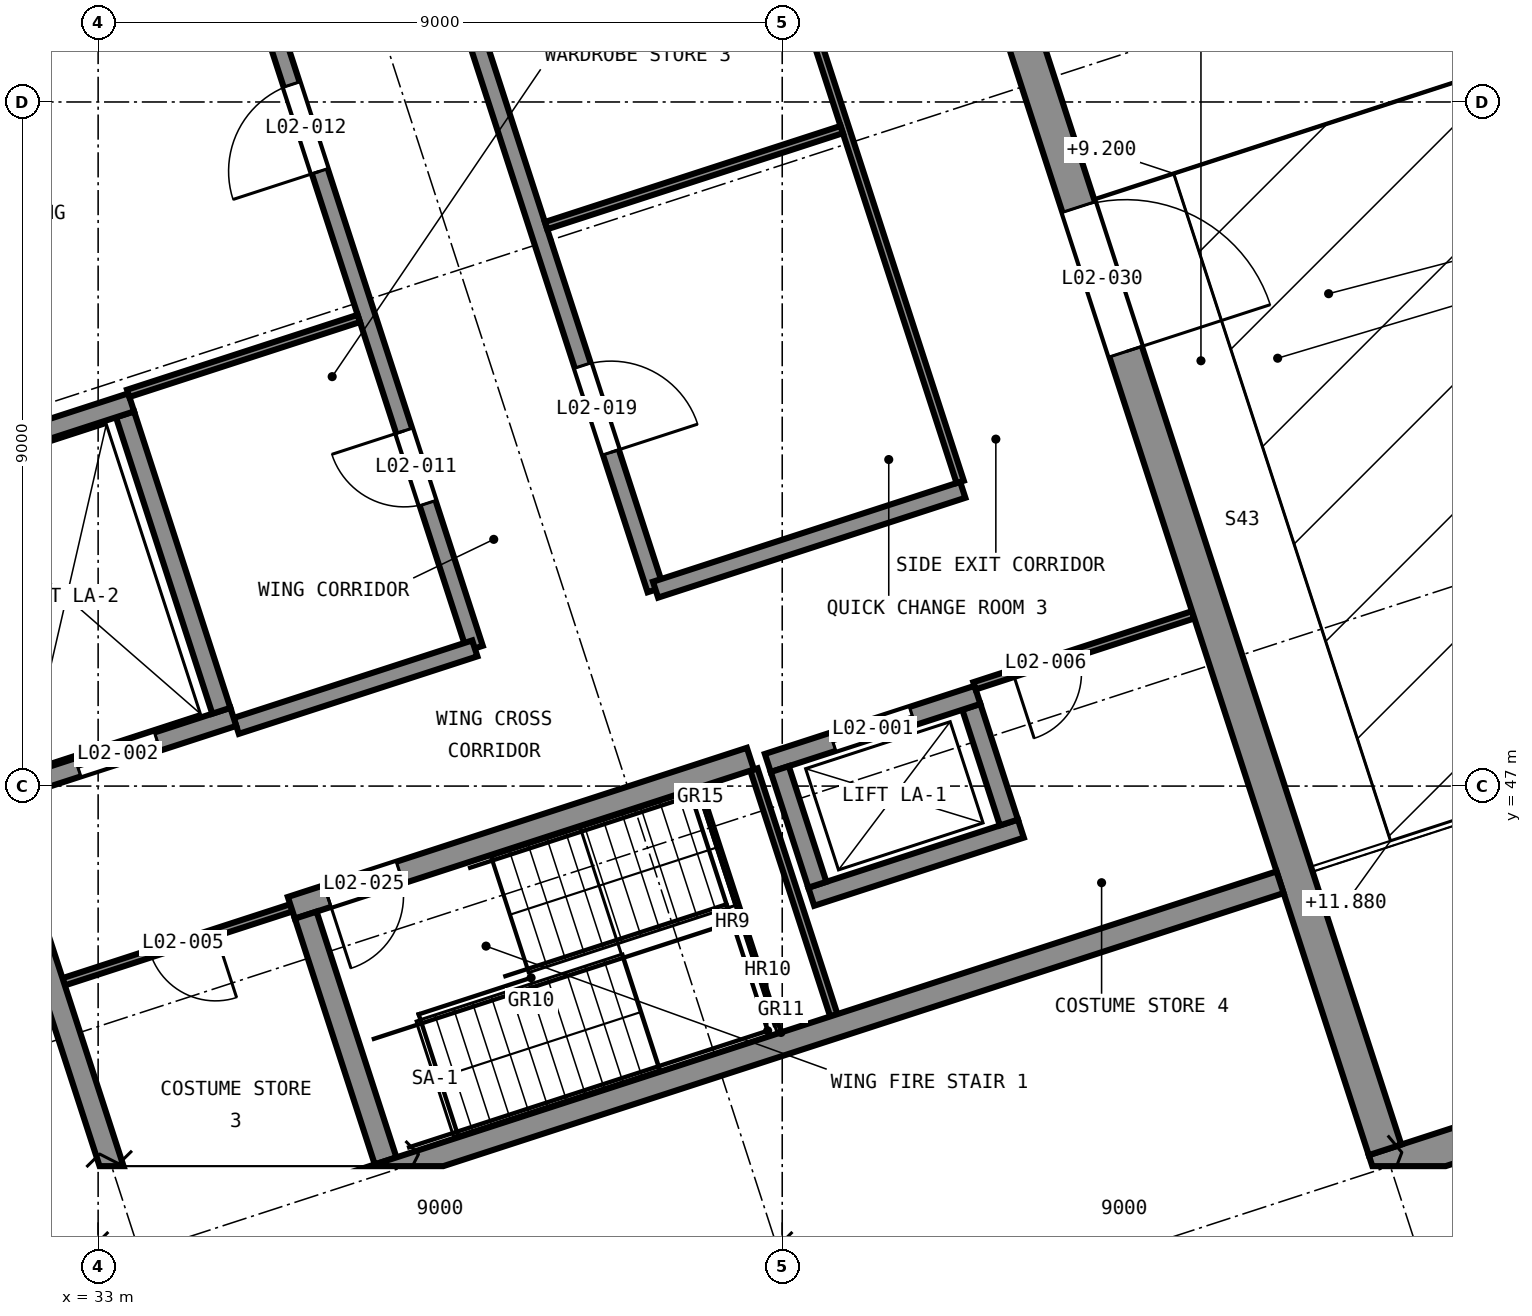
"""IFC4 building model, lengths in metres.
Left out: names, types, materials, properties, quantities, classifications, styles, units other than length and angle.
Written with IfcOpenShell. Run it as: python <this file> out.ifc"""

import sys

from ifc_helpers import new_model, si_unit, direction, frame, frame_2d, origin, place, context, subcontext, project, spatial, rectangle, extrude, element, fill, save


model = new_model("IFC4")
c1 = context("Model", 3, precision=1e-05, world=origin(), true_north=direction((0.0, 1.0)))
c2 = subcontext(c1, "Body", "Model", "MODEL_VIEW")
j1 = project(units=[si_unit("LENGTHUNIT", "METRE"), si_unit("PLANEANGLEUNIT", "RADIAN")], contexts=[c1])
p1 = place(None, origin())
s1 = spatial("IfcSite", under=j1, at=p1, CompositionType="ELEMENT")
p2 = place(p1, origin())
s2 = spatial("IfcBuilding", under=s1, at=p2, CompositionType="ELEMENT")
p3 = place(p2, frame((0.0, 0.0, 9.5)))
s3 = spatial("IfcBuildingStorey", under=s2, at=p3, CompositionType="ELEMENT", Elevation=9.5)
p4 = place(p3, frame((49.786, 41.93, 0.0), z_axis=(0.0, 0.0, 1.0), x_axis=(0.951055937194, 0.309018776661, 0.0)))
e1 = element("IfcWall", 1, at=p4, inside=s3, PredefinedType="SHEAR", context=c2, shape_type="SweptSolid", body=[
    extrude(rectangle(XDim=29.45, YDim=0.45, at=frame_2d((14.725, 0.0))), origin(), (0.0, 0.0, 1.0), 4.0),
])
p5 = place(p3, frame((49.93, 42.214, 0.0), z_axis=(0.0, 0.0, 1.0), x_axis=(-0.309016215614, 0.95105676933, 0.0)))
e2 = element("IfcWall", 2, at=p5, inside=s3, PredefinedType="SHEAR", context=c2, shape_type="SweptSolid", body=[
    extrude(rectangle(XDim=27.975, YDim=0.45, at=frame_2d((13.988, 0.0))), origin(), (0.0, 0.0, 1.0), 4.0),
])
p6 = place(p5, frame((11.042, 0.0, 0.0)))
e3 = element("IfcOpeningElement", 3, at=p6, cuts=e2, PredefinedType="OPENING", context=c2, shape_type="SweptSolid", body=[
    extrude(rectangle(XDim=2.0, YDim=2.4, at=frame_2d((1.0, 1.2))), frame((0.0, 0.235, 0.0), z_axis=(0.0, -1.0, 0.0), x_axis=(1.0, 0.0, 0.0)), (0.0, 0.0, 1.0), 0.47),
])
p7 = place(p3, frame((48.55, 45.735, 0.0), z_axis=(0.0, 0.0, 1.0), x_axis=(-0.951061216338, -0.309002528757, 0.0)))
e4 = element("IfcWall", 4, at=p7, inside=s3, PredefinedType="SOLIDWALL", context=c2, shape_type="SweptSolid", body=[
    extrude(rectangle(XDim=15.925, YDim=0.3, at=frame_2d((7.962, 0.0))), origin(), (0.0, 0.0, 1.0), 4.0),
])
p8 = place(p3, frame((33.501, 41.003, 0.0), z_axis=(0.0, 0.0, 1.0), x_axis=(-0.309017194826, 0.951056451165, 0.0)))
e5 = element("IfcWall", 5, at=p8, inside=s3, PredefinedType="SOLIDWALL", context=c2, shape_type="SweptSolid", body=[
    extrude(rectangle(XDim=53.7, YDim=0.3, at=frame_2d((26.85, 0.0))), origin(), (0.0, 0.0, 1.0), 4.0),
])
p9 = place(p8, frame((21.55, 0.0, 0.9)))
e6 = element("IfcOpeningElement", 6, at=p9, cuts=e5, PredefinedType="OPENING", context=c2, shape_type="SweptSolid", body=[
    extrude(rectangle(XDim=3.6, YDim=2.1, at=frame_2d((1.8, 1.05))), frame((0.0, 0.16, 0.0), z_axis=(0.0, -1.0, 0.0), x_axis=(1.0, 0.0, 0.0)), (0.0, 0.0, 1.0), 0.32),
])
p10 = place(p3, frame((41.581, 47.361, 0.0), z_axis=(0.0, 0.0, 1.0), x_axis=(-0.951058929949, -0.309009565815, 0.0)))
e7 = element("IfcWall", 7, at=p10, inside=s3, PredefinedType="SOLIDWALL", context=c2, shape_type="SweptSolid", body=[
    extrude(rectangle(XDim=6.35, YDim=0.3, at=frame_2d((3.175, 0.0))), origin(), (0.0, 0.0, 1.0), 3.7),
])
p11 = place(p10, frame((4.85, 0.0, 0.0)))
e8 = element("IfcOpeningElement", 8, at=p11, cuts=e7, PredefinedType="OPENING", context=c2, shape_type="SweptSolid", body=[
    extrude(rectangle(XDim=1.0, YDim=2.1, at=frame_2d((0.5, 1.05))), frame((0.0, 0.16, 0.0), z_axis=(0.0, -1.0, 0.0), x_axis=(1.0, 0.0, 0.0)), (0.0, 0.0, 1.0), 0.32),
])
p12 = place(p3, frame((35.731, 45.302, 0.0), z_axis=(0.0, 0.0, 1.0), x_axis=(0.308980533303, -0.951068362443, 0.0)))
e9 = element("IfcWall", 9, at=p12, inside=s3, PredefinedType="SOLIDWALL", context=c2, shape_type="SweptSolid", body=[
    extrude(rectangle(XDim=3.4, YDim=0.3, at=frame_2d((1.7, 0.0))), origin(), (0.0, 0.0, 1.0), 3.7),
])
p13 = place(p3, frame((42.382, 45.544, 0.0), z_axis=(0.0, 0.0, 1.0), x_axis=(0.951071801089, 0.308969948659, 0.0)))
e10 = element("IfcWall", 10, at=p13, inside=s3, PredefinedType="SHEAR", context=c2, shape_type="SweptSolid", body=[
    extrude(rectangle(XDim=2.9, YDim=0.25, at=frame_2d((1.45, 0.0))), origin(), (0.0, 0.0, 1.0), 4.0),
])
p14 = place(p3, frame((44.982, 46.521, 0.0), z_axis=(0.0, 0.0, 1.0), x_axis=(-0.308986014439, 0.951066581729, 0.0)))
e11 = element("IfcWall", 11, at=p14, inside=s3, PredefinedType="SHEAR", context=c2, shape_type="SweptSolid", body=[
    extrude(rectangle(XDim=1.6, YDim=0.25, at=frame_2d((0.8, 0.0))), origin(), (0.0, 0.0, 1.0), 4.0),
])
p15 = place(p3, frame((44.568, 48.2, 0.0), z_axis=(0.0, 0.0, 1.0), x_axis=(-0.951047059821, -0.309046096893, 0.0)))
e12 = element("IfcWall", 12, at=p15, inside=s3, PredefinedType="SHEAR", context=c2, shape_type="SweptSolid", body=[
    extrude(rectangle(XDim=2.9, YDim=0.25, at=frame_2d((1.45, 0.0))), origin(), (0.0, 0.0, 1.0), 4.0),
])
p16 = place(p15, frame((0.9, 0.0, 0.0)))
e13 = element("IfcOpeningElement", 13, at=p16, cuts=e12, PredefinedType="OPENING", context=c2, shape_type="SweptSolid", body=[
    extrude(rectangle(XDim=1.1, YDim=2.1, at=frame_2d((0.55, 1.05))), frame((0.0, 0.135, 0.0), z_axis=(0.0, -1.0, 0.0), x_axis=(1.0, 0.0, 0.0)), (0.0, 0.0, 1.0), 0.27),
])
p17 = place(p3, frame((41.968, 47.224, 0.0), z_axis=(0.0, 0.0, 1.0), x_axis=(0.308986014439, -0.951066581729, 0.0)))
e14 = element("IfcWall", 14, at=p17, inside=s3, PredefinedType="SHEAR", context=c2, shape_type="SweptSolid", body=[
    extrude(rectangle(XDim=1.6, YDim=0.25, at=frame_2d((0.8, 0.0))), origin(), (0.0, 0.0, 1.0), 4.0),
])
p18 = place(p3, frame((31.735, 46.922, 0.0), z_axis=(0.0, 0.0, 1.0), x_axis=(0.95104415986, 0.309055020985, 0.0)))
e15 = element("IfcWall", 15, at=p18, inside=s3, PredefinedType="SHEAR", context=c2, shape_type="SweptSolid", body=[
    extrude(rectangle(XDim=3.2, YDim=0.25, at=frame_2d((1.6, 0.0))), origin(), (0.0, 0.0, 1.0), 4.0),
])
p19 = place(p18, frame((1.05, 0.0, 0.0)))
e16 = element("IfcOpeningElement", 16, at=p19, cuts=e15, PredefinedType="OPENING", context=c2, shape_type="SweptSolid", body=[
    extrude(rectangle(XDim=1.1, YDim=2.1, at=frame_2d((0.55, 1.05))), frame((0.0, 0.135, 0.0), z_axis=(0.0, -1.0, 0.0), x_axis=(1.0, 0.0, 0.0)), (0.0, 0.0, 1.0), 0.27),
])
p20 = place(p3, frame((34.621, 47.991, 0.0), z_axis=(0.0, 0.0, 1.0), x_axis=(-0.309055103076, 0.951044133184, 0.0)))
e17 = element("IfcWall", 17, at=p20, inside=s3, PredefinedType="SHEAR", context=c2, shape_type="SweptSolid", body=[
    extrude(rectangle(XDim=4.1, YDim=0.25, at=frame_2d((2.05, 0.0))), origin(), (0.0, 0.0, 1.0), 4.0),
])
p21 = place(p3, frame((33.434, 52.048, 0.0), z_axis=(0.0, 0.0, 1.0), x_axis=(-0.951066581729, -0.308986014439, 0.0)))
e18 = element("IfcWall", 18, at=p21, inside=s3, PredefinedType="SHEAR", context=c2, shape_type="SweptSolid", body=[
    extrude(rectangle(XDim=3.2, YDim=0.25, at=frame_2d((1.6, 0.0))), origin(), (0.0, 0.0, 1.0), 4.0),
])
p22 = place(p3, frame((37.956, 48.812, 0.0), z_axis=(0.0, 0.0, 1.0), x_axis=(-0.30901736393, 0.951056396219, 0.0)))
e19 = element("IfcWall", 19, at=p22, inside=s3, PredefinedType="SOLIDWALL", context=c2, shape_type="SweptSolid", body=[
    extrude(rectangle(XDim=41.7, YDim=0.22, at=frame_2d((20.85, 0.0))), origin(), (0.0, 0.0, 1.0), 3.7),
])
p23 = place(p22, frame((2.009, 0.0, 0.0)))
e20 = element("IfcOpeningElement", 20, at=p23, cuts=e19, PredefinedType="OPENING", context=c2, shape_type="SweptSolid", body=[
    extrude(rectangle(XDim=1.0, YDim=2.1, at=frame_2d((0.5, 1.05))), frame((0.0, 0.12, 0.0), z_axis=(0.0, -1.0, 0.0), x_axis=(1.0, 0.0, 0.0)), (0.0, 0.0, 1.0), 0.24),
])
p24 = place(p22, frame((6.6, 0.0, 0.0)))
e21 = element("IfcOpeningElement", 21, at=p24, cuts=e19, PredefinedType="OPENING", context=c2, shape_type="SweptSolid", body=[
    extrude(rectangle(XDim=1.2, YDim=2.1, at=frame_2d((0.6, 1.05))), frame((0.0, 0.12, 0.0), z_axis=(0.0, -1.0, 0.0), x_axis=(1.0, 0.0, 0.0)), (0.0, 0.0, 1.0), 0.24),
])
p25 = place(p22, frame((11.7, 0.0, 0.0)))
e22 = element("IfcOpeningElement", 22, at=p25, cuts=e19, PredefinedType="OPENING", context=c2, shape_type="SweptSolid", body=[
    extrude(rectangle(XDim=1.2, YDim=2.1, at=frame_2d((0.6, 1.05))), frame((0.0, 0.12, 0.0), z_axis=(0.0, -1.0, 0.0), x_axis=(1.0, 0.0, 0.0)), (0.0, 0.0, 1.0), 0.24),
])
p26 = place(p22, frame((16.7, 0.0, 0.0)))
e23 = element("IfcOpeningElement", 23, at=p26, cuts=e19, PredefinedType="OPENING", context=c2, shape_type="SweptSolid", body=[
    extrude(rectangle(XDim=1.2, YDim=2.1, at=frame_2d((0.6, 1.05))), frame((0.0, 0.12, 0.0), z_axis=(0.0, -1.0, 0.0), x_axis=(1.0, 0.0, 0.0)), (0.0, 0.0, 1.0), 0.24),
])
p27 = place(p22, frame((21.7, 0.0, 0.0)))
e24 = element("IfcOpeningElement", 24, at=p27, cuts=e19, PredefinedType="OPENING", context=c2, shape_type="SweptSolid", body=[
    extrude(rectangle(XDim=1.2, YDim=2.1, at=frame_2d((0.6, 1.05))), frame((0.0, 0.12, 0.0), z_axis=(0.0, -1.0, 0.0), x_axis=(1.0, 0.0, 0.0)), (0.0, 0.0, 1.0), 0.24),
])
p28 = place(p22, frame((26.7, 0.0, 0.0)))
e25 = element("IfcOpeningElement", 25, at=p28, cuts=e19, PredefinedType="OPENING", context=c2, shape_type="SweptSolid", body=[
    extrude(rectangle(XDim=1.2, YDim=2.1, at=frame_2d((0.6, 1.05))), frame((0.0, 0.12, 0.0), z_axis=(0.0, -1.0, 0.0), x_axis=(1.0, 0.0, 0.0)), (0.0, 0.0, 1.0), 0.24),
])
p29 = place(p22, frame((31.739, 0.0, 0.0)))
e26 = element("IfcOpeningElement", 26, at=p29, cuts=e19, PredefinedType="OPENING", context=c2, shape_type="SweptSolid", body=[
    extrude(rectangle(XDim=1.2, YDim=2.1, at=frame_2d((0.6, 1.05))), frame((0.0, 0.12, 0.0), z_axis=(0.0, -1.0, 0.0), x_axis=(1.0, 0.0, 0.0)), (0.0, 0.0, 1.0), 0.24),
])
p30 = place(p3, frame((40.333, 49.584, 0.0), z_axis=(0.0, 0.0, 1.0), x_axis=(-0.309015643281, 0.951056955291, 0.0)))
e27 = element("IfcWall", 27, at=p30, inside=s3, PredefinedType="SOLIDWALL", context=c2, shape_type="SweptSolid", body=[
    extrude(rectangle(XDim=41.7, YDim=0.22, at=frame_2d((20.85, 0.0))), origin(), (0.0, 0.0, 1.0), 3.7),
])
p31 = place(p30, frame((1.9, 0.0, 0.0)))
e28 = element("IfcOpeningElement", 28, at=p31, cuts=e27, PredefinedType="OPENING", context=c2, shape_type="SweptSolid", body=[
    extrude(rectangle(XDim=1.2, YDim=2.1, at=frame_2d((0.6, 1.05))), frame((0.0, 0.12, 0.0), z_axis=(0.0, -1.0, 0.0), x_axis=(1.0, 0.0, 0.0)), (0.0, 0.0, 1.0), 0.24),
])
p32 = place(p30, frame((8.285, 0.0, 0.0)))
e29 = element("IfcOpeningElement", 29, at=p32, cuts=e27, PredefinedType="OPENING", context=c2, shape_type="SweptSolid", body=[
    extrude(rectangle(XDim=1.0, YDim=2.1, at=frame_2d((0.5, 1.05))), frame((0.0, 0.12, 0.0), z_axis=(0.0, -1.0, 0.0), x_axis=(1.0, 0.0, 0.0)), (0.0, 0.0, 1.0), 0.24),
])
p33 = place(p30, frame((16.475, 0.0, 0.0)))
e30 = element("IfcOpeningElement", 30, at=p33, cuts=e27, PredefinedType="OPENING", context=c2, shape_type="SweptSolid", body=[
    extrude(rectangle(XDim=1.0, YDim=2.1, at=frame_2d((0.5, 1.05))), frame((0.0, 0.12, 0.0), z_axis=(0.0, -1.0, 0.0), x_axis=(1.0, 0.0, 0.0)), (0.0, 0.0, 1.0), 0.24),
])
p34 = place(p30, frame((25.752, 0.0, 0.0)))
e31 = element("IfcOpeningElement", 31, at=p34, cuts=e27, PredefinedType="OPENING", context=c2, shape_type="SweptSolid", body=[
    extrude(rectangle(XDim=1.0, YDim=2.1, at=frame_2d((0.5, 1.05))), frame((0.0, 0.12, 0.0), z_axis=(0.0, -1.0, 0.0), x_axis=(1.0, 0.0, 0.0)), (0.0, 0.0, 1.0), 0.24),
])
p35 = place(p30, frame((32.761, 0.0, 0.0)))
e32 = element("IfcOpeningElement", 32, at=p35, cuts=e27, PredefinedType="OPENING", context=c2, shape_type="SweptSolid", body=[
    extrude(rectangle(XDim=1.0, YDim=2.1, at=frame_2d((0.5, 1.05))), frame((0.0, 0.12, 0.0), z_axis=(0.0, -1.0, 0.0), x_axis=(1.0, 0.0, 0.0)), (0.0, 0.0, 1.0), 0.24),
])
p36 = place(p3, frame((34.817, 47.792, 0.0), z_axis=(0.0, 0.0, 1.0), x_axis=(0.951053095941, 0.309027520945, 0.0)))
e33 = element("IfcWall", 33, at=p36, inside=s3, PredefinedType="SOLIDWALL", context=c2, shape_type="SweptSolid", body=[
    extrude(rectangle(XDim=3.3, YDim=0.22, at=frame_2d((1.65, 0.0))), origin(), (0.0, 0.0, 1.0), 3.7),
])
p37 = place(p3, frame((40.333, 49.584, 0.0), z_axis=(0.0, 0.0, 1.0), x_axis=(0.951062770994, 0.308997743729, 0.0)))
e34 = element("IfcWall", 34, at=p37, inside=s3, PredefinedType="SOLIDWALL", context=c2, shape_type="SweptSolid", body=[
    extrude(rectangle(XDim=4.25, YDim=0.22, at=frame_2d((2.125, 0.0))), origin(), (0.0, 0.0, 1.0), 3.7),
])
p38 = place(p3, frame((32.546, 44.425, 0.0), z_axis=(0.0, 0.0, 1.0), x_axis=(0.951058557014, 0.309010713619, 0.0)))
e35 = element("IfcWall", 35, at=p38, inside=s3, PredefinedType="PARTITIONING", context=c2, shape_type="SweptSolid", body=[
    extrude(rectangle(XDim=3.15, YDim=0.1, at=frame_2d((1.575, 0.0))), origin(), (0.0, 0.0, 1.0), 3.7),
])
p39 = place(p38, frame((1.2, 0.0, 0.0)))
e36 = element("IfcOpeningElement", 36, at=p39, cuts=e35, PredefinedType="OPENING", context=c2, shape_type="SweptSolid", body=[
    extrude(rectangle(XDim=0.9, YDim=2.1, at=frame_2d((0.45, 1.05))), frame((0.0, 0.06, 0.0), z_axis=(0.0, -1.0, 0.0), x_axis=(1.0, 0.0, 0.0)), (0.0, 0.0, 1.0), 0.12),
])
p40 = place(p3, frame((44.53, 48.319, 0.0), z_axis=(0.0, 0.0, 1.0), x_axis=(0.951053046121, 0.30902767427, 0.0)))
e37 = element("IfcWall", 37, at=p40, inside=s3, PredefinedType="PARTITIONING", context=c2, shape_type="SweptSolid", body=[
    extrude(rectangle(XDim=3.025, YDim=0.1, at=frame_2d((1.512, 0.0))), origin(), (0.0, 0.0, 1.0), 3.7),
])
p41 = place(p40, frame((0.533, 0.0, 0.0)))
e38 = element("IfcOpeningElement", 38, at=p41, cuts=e37, PredefinedType="OPENING", context=c2, shape_type="SweptSolid", body=[
    extrude(rectangle(XDim=0.9, YDim=2.1, at=frame_2d((0.45, 1.05))), frame((0.0, 0.06, 0.0), z_axis=(0.0, -1.0, 0.0), x_axis=(1.0, 0.0, 0.0)), (0.0, 0.0, 1.0), 0.12),
])
p42 = place(p3, frame((33.396, 52.167, 0.0), z_axis=(0.0, 0.0, 1.0), x_axis=(0.951044192343, 0.309054921027, 0.0)))
e39 = element("IfcWall", 39, at=p42, inside=s3, PredefinedType="PARTITIONING", context=c2, shape_type="SweptSolid", body=[
    extrude(rectangle(XDim=3.19, YDim=0.1, at=frame_2d((1.595, 0.0))), origin(), (0.0, 0.0, 1.0), 3.7),
])
p43 = place(p3, frame((38.893, 54.373, 0.0), z_axis=(0.0, 0.0, 1.0), x_axis=(0.951055560564, 0.309019935796, 0.0)))
e40 = element("IfcWall", 40, at=p43, inside=s3, PredefinedType="PARTITIONING", context=c2, shape_type="SweptSolid", body=[
    extrude(rectangle(XDim=4.09, YDim=0.1, at=frame_2d((2.045, 0.0))), origin(), (0.0, 0.0, 1.0), 3.7),
])
p44 = place(p3, frame((28.745, 56.123, 0.0), z_axis=(0.0, 0.0, 1.0), x_axis=(0.951059053869, 0.309009184417, 0.0)))
e41 = element("IfcWall", 41, at=p44, inside=s3, PredefinedType="PARTITIONING", context=c2, shape_type="SweptSolid", body=[
    extrude(rectangle(XDim=6.39, YDim=0.1, at=frame_2d((3.195, 0.0))), origin(), (0.0, 0.0, 1.0), 3.7),
])
p45 = place(p3, frame((42.678, 43.985, 0.0), z_axis=(0.0, 0.0, 1.0), x_axis=(-0.309045481752, 0.951047259714, 0.0)))
e42 = element("IfcWall", 42, at=p45, inside=s3, PredefinedType="PARTITIONING", context=c2, shape_type="SweptSolid", body=[
    extrude(rectangle(XDim=3.4, YDim=0.1, at=frame_2d((1.7, 0.0))), origin(), (0.0, 0.0, 1.0), 3.7),
])
p46 = place(p3, frame((44.341, 51.002, 0.0), z_axis=(0.0, 0.0, 1.0), x_axis=(-0.309016547708, 0.951056661426, 0.0)))
e43 = element("IfcWall", 43, at=p46, inside=s3, PredefinedType="PARTITIONING", context=c2, shape_type="SweptSolid", body=[
    extrude(rectangle(XDim=11.99, YDim=0.1, at=frame_2d((5.995, 0.0))), origin(), (0.0, 0.0, 1.0), 3.7),
])
p47 = place(p16, origin())
e44 = element("IfcDoor", 44, at=p47, inside=s3, OperationType="SLIDING_TO_LEFT", PredefinedType="DOOR", context=c2, shape_type="SweptSolid", body=[
    extrude(rectangle(XDim=1.1, YDim=2.1, at=frame_2d((0.55, 1.05))), frame((0.0, 0.025, 0.0), z_axis=(0.0, -1.0, 0.0), x_axis=(1.0, 0.0, 0.0)), (0.0, 0.0, 1.0), 0.05),
])
fill(e13, e44)
p48 = place(p19, origin())
e45 = element("IfcDoor", 45, at=p48, inside=s3, OperationType="SLIDING_TO_LEFT", PredefinedType="DOOR", context=c2, shape_type="SweptSolid", body=[
    extrude(rectangle(XDim=1.1, YDim=2.1, at=frame_2d((0.55, 1.05))), frame((0.0, 0.025, 0.0), z_axis=(0.0, -1.0, 0.0), x_axis=(1.0, 0.0, 0.0)), (0.0, 0.0, 1.0), 0.05),
])
fill(e16, e45)
p49 = place(p39, frame((0.9, 0.0, 0.0), z_axis=(0.0, 0.0, 1.0), x_axis=(-1.0, 0.0, 0.0)))
e46 = element("IfcDoor", 46, at=p49, inside=s3, OperationType="SINGLE_SWING_RIGHT", PredefinedType="DOOR", context=c2, shape_type="SweptSolid", body=[
    extrude(rectangle(XDim=0.9, YDim=2.1, at=frame_2d((0.45, 1.05))), frame((0.0, 0.025, 0.0), z_axis=(0.0, -1.0, 0.0), x_axis=(1.0, 0.0, 0.0)), (0.0, 0.0, 1.0), 0.05),
])
fill(e36, e46)
p50 = place(p41, frame((0.9, 0.0, 0.0), z_axis=(0.0, 0.0, 1.0), x_axis=(-1.0, 0.0, 0.0)))
e47 = element("IfcDoor", 47, at=p50, inside=s3, OperationType="SINGLE_SWING_LEFT", PredefinedType="DOOR", context=c2, shape_type="SweptSolid", body=[
    extrude(rectangle(XDim=0.9, YDim=2.1, at=frame_2d((0.45, 1.05))), frame((0.0, 0.025, 0.0), z_axis=(0.0, -1.0, 0.0), x_axis=(1.0, 0.0, 0.0)), (0.0, 0.0, 1.0), 0.05),
])
fill(e38, e47)
p51 = place(p23, origin())
e48 = element("IfcDoor", 48, at=p51, inside=s3, OperationType="SINGLE_SWING_LEFT", PredefinedType="DOOR", context=c2, shape_type="SweptSolid", body=[
    extrude(rectangle(XDim=1.0, YDim=2.1, at=frame_2d((0.5, 1.05))), frame((0.0, 0.025, 0.0), z_axis=(0.0, -1.0, 0.0), x_axis=(1.0, 0.0, 0.0)), (0.0, 0.0, 1.0), 0.05),
])
fill(e20, e48)
p52 = place(p24, origin())
e49 = element("IfcDoor", 49, at=p52, inside=s3, OperationType="SINGLE_SWING_RIGHT", PredefinedType="DOOR", context=c2, shape_type="SweptSolid", body=[
    extrude(rectangle(XDim=1.2, YDim=2.1, at=frame_2d((0.6, 1.05))), frame((0.0, 0.025, 0.0), z_axis=(0.0, -1.0, 0.0), x_axis=(1.0, 0.0, 0.0)), (0.0, 0.0, 1.0), 0.05),
])
fill(e21, e49)
p53 = place(p31, frame((1.2, 0.0, 0.0), z_axis=(0.0, 0.0, 1.0), x_axis=(-1.0, 0.0, 0.0)))
e50 = element("IfcDoor", 50, at=p53, inside=s3, OperationType="SINGLE_SWING_LEFT", PredefinedType="DOOR", context=c2, shape_type="SweptSolid", body=[
    extrude(rectangle(XDim=1.2, YDim=2.1, at=frame_2d((0.6, 1.05))), frame((0.0, 0.025, 0.0), z_axis=(0.0, -1.0, 0.0), x_axis=(1.0, 0.0, 0.0)), (0.0, 0.0, 1.0), 0.05),
])
fill(e28, e50)
p54 = place(p11, origin())
e51 = element("IfcDoor", 51, at=p54, inside=s3, OperationType="SINGLE_SWING_LEFT", PredefinedType="DOOR", context=c2, shape_type="SweptSolid", body=[
    extrude(rectangle(XDim=1.0, YDim=2.1, at=frame_2d((0.5, 1.05))), frame((0.0, 0.025, 0.0), z_axis=(0.0, -1.0, 0.0), x_axis=(1.0, 0.0, 0.0)), (0.0, 0.0, 1.0), 0.05),
])
fill(e8, e51)
p55 = place(p6, frame((2.0, 0.0, 0.0), z_axis=(0.0, 0.0, 1.0), x_axis=(-1.0, 0.0, 0.0)))
e52 = element("IfcDoor", 52, at=p55, inside=s3, OperationType="DOUBLE_DOOR_SINGLE_SWING", PredefinedType="DOOR", context=c2, shape_type="SweptSolid", body=[
    extrude(rectangle(XDim=2.0, YDim=2.4, at=frame_2d((1.0, 1.2))), frame((0.0, 0.025, 0.0), z_axis=(0.0, -1.0, 0.0), x_axis=(1.0, 0.0, 0.0)), (0.0, 0.0, 1.0), 0.05),
])
fill(e3, e52)
save(model, sys.argv[1])
